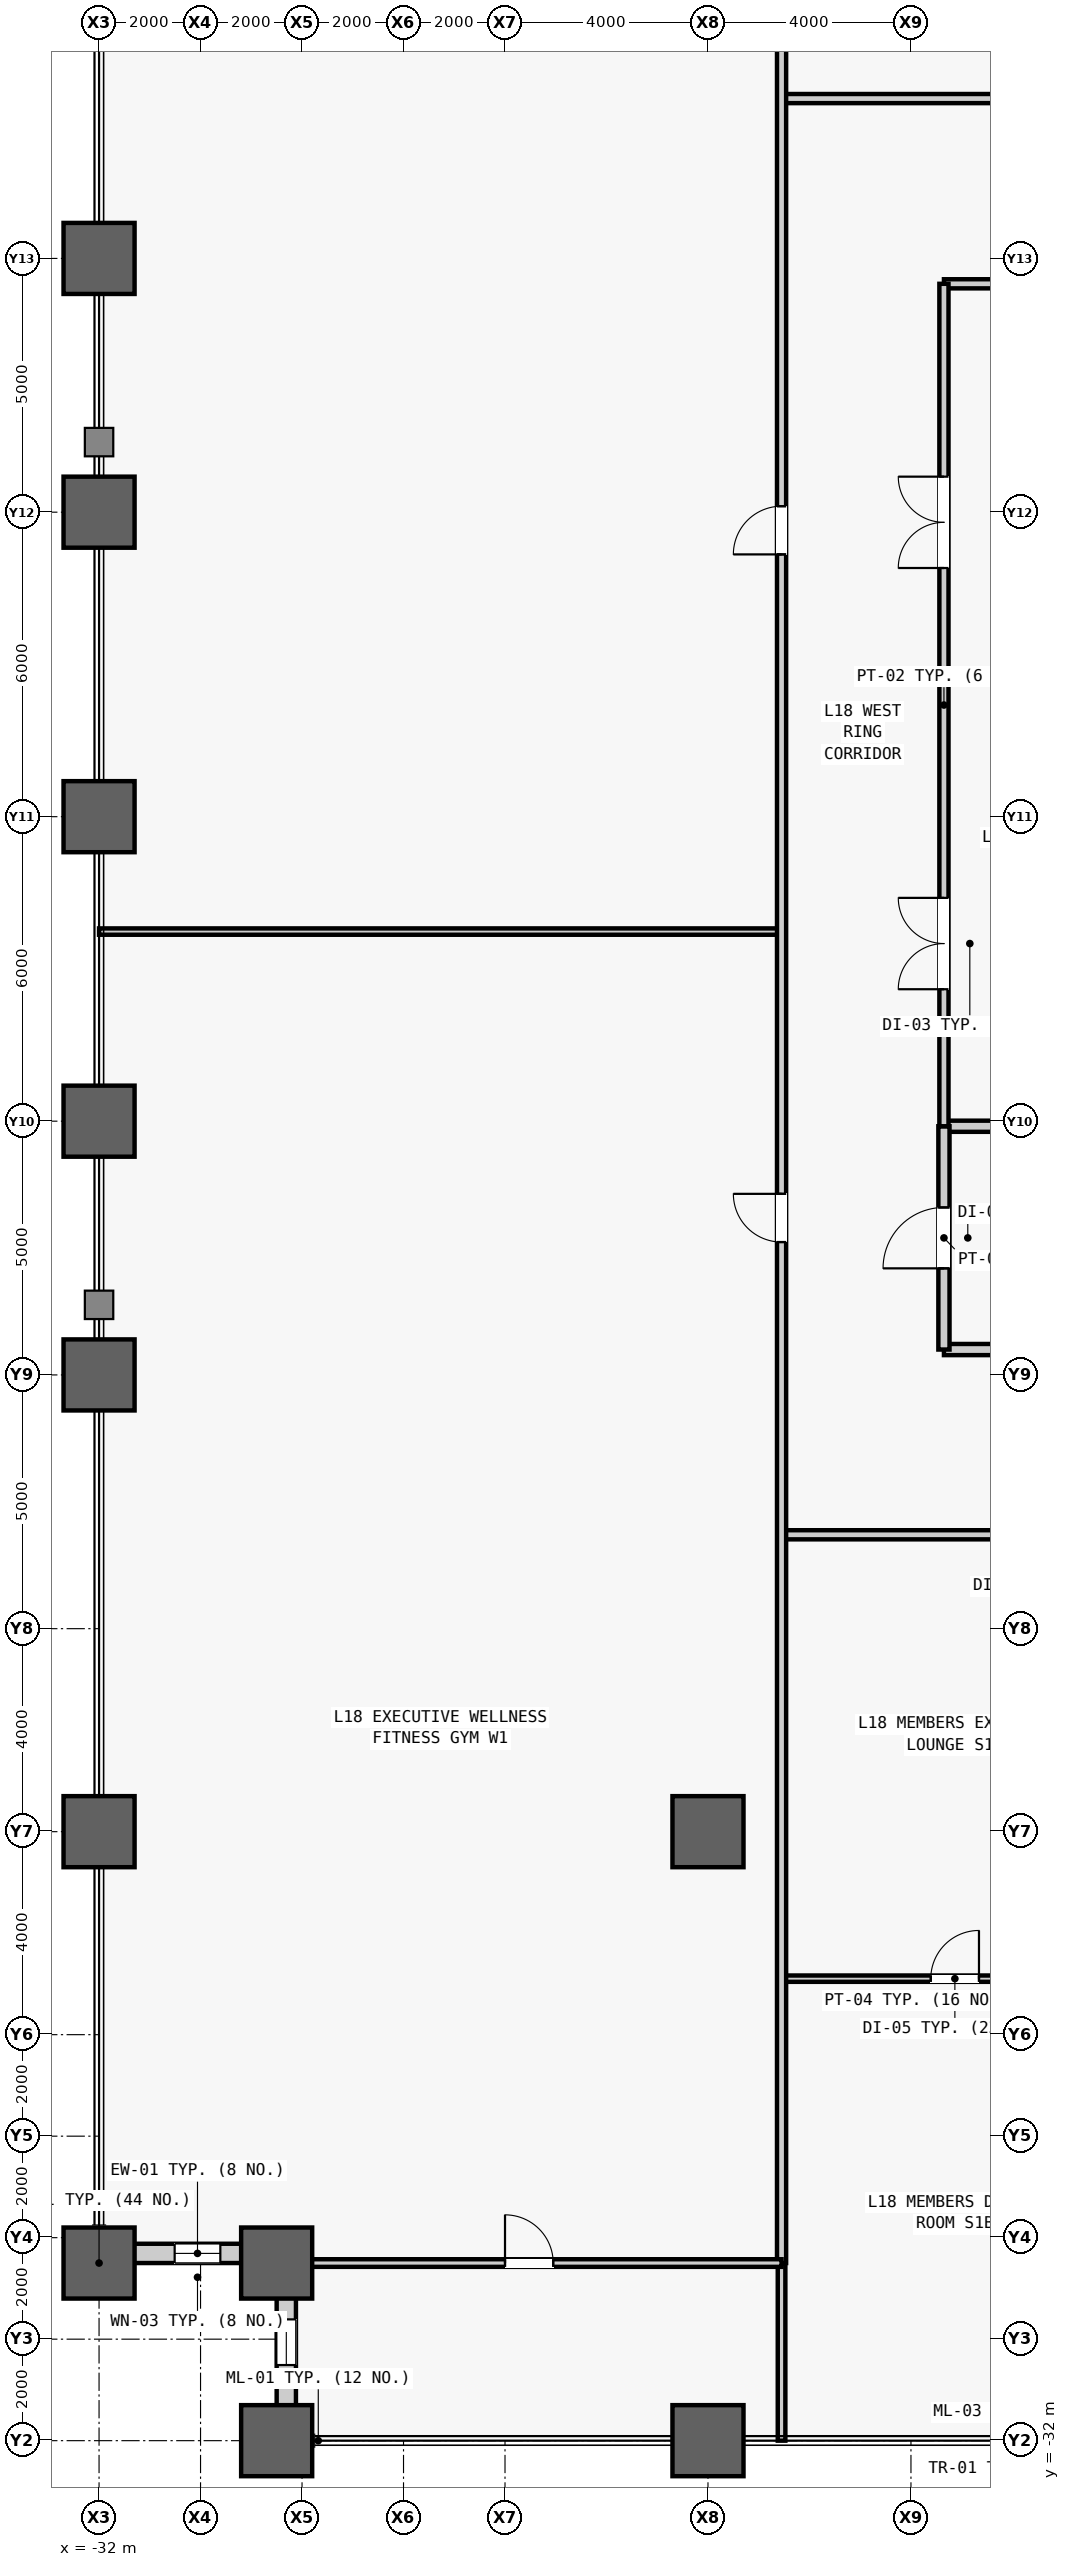
"""IFC4 building model, lengths in metres.
Left out: names, types, materials, properties, quantities, classifications, styles, units other than length and angle.
Written with IfcOpenShell. Run it as: python <this file> out.ifc"""

import sys

from ifc_helpers import new_model, si_unit, direction, frame, frame_2d, origin, origin_2d, place, context, subcontext, project, spatial, rectangle, hollow_rectangle, extrude, source, transform, mapped, element, fill, save


model = new_model("IFC4")
c1 = context("Model", 3, precision=1e-05, world=origin(), true_north=direction((0.0, 1.0)))
c2 = subcontext(c1, "Body", "Model", "MODEL_VIEW")
j1 = project(units=[si_unit("LENGTHUNIT", "METRE"), si_unit("PLANEANGLEUNIT", "RADIAN")], contexts=[c1])
p1 = place(None, origin())
s1 = spatial("IfcSite", under=j1, at=p1, CompositionType="ELEMENT")
p2 = place(p1, origin())
s2 = spatial("IfcBuilding", under=s1, at=p2, CompositionType="ELEMENT")
p3 = place(p2, frame((0.0, 0.0, 83.0)))
s3 = spatial("IfcBuildingStorey", under=s2, at=p3, CompositionType="ELEMENT", Elevation=83.0)
m1 = source(origin(), c2, "Body", "SweptSolid", [
    extrude(hollow_rectangle(XDim=1.4, YDim=1.4, WallThickness=0.075, at=origin_2d()), origin(), (0.0, 0.0, 1.0), 4.2),
])
for number, where, z_axis, x_axis in (
    (1, (-32.0, -28.5, 0.0), (0.0, 0.0, 1.0), (1.0, 0.0, 0.0)),
    (2, (-32.0, -20.0, 0.0), (0.0, 0.0, 1.0), (1.0, 0.0, 0.0)),
    (3, (-32.0, -11.0, 0.0), (0.0, 0.0, 1.0), (1.0, 0.0, 0.0)),
    (4, (-32.0, -6.0, 0.0), (0.0, 0.0, 1.0), (1.0, 0.0, 0.0)),
    (5, (-32.0, 0.0, 0.0), (0.0, 0.0, 1.0), (1.0, 0.0, 0.0)),
    (6, (-32.0, 6.0, 0.0), (0.0, 0.0, 1.0), (1.0, 0.0, 0.0)),
    (7, (-32.0, 11.0, 0.0), (0.0, 0.0, 1.0), (1.0, 0.0, 0.0)),
    (8, (-28.5, -32.0, 0.0), (0.0, 0.0, 1.0), (1.0, 0.0, 0.0)),
    (9, (-28.5, -28.5, 0.0), (0.0, 0.0, 1.0), (1.0, 0.0, 0.0)),
    (10, (-20.0, -32.0, 0.0), (0.0, 0.0, 1.0), (1.0, 0.0, 0.0)),
    (11, (-20.0, -20.0, 0.0), (0.0, 0.0, 1.0), (1.0, 0.0, 0.0)),
):
    element("IfcColumn", number, at=place(p3, frame(where, z_axis=z_axis, x_axis=x_axis)), inside=s3, PredefinedType="COLUMN", context=c2, shape_type="MappedRepresentation", body=[
        mapped(m1, transform((0.0, 0.0, 0.0), scale=1.0)),
    ])
m2 = source(origin(), c2, "Body", "SweptSolid", [
    extrude(rectangle(XDim=3.12, YDim=0.38, at=frame_2d((1.56, 0.0))), origin(), (0.0, 0.0, 1.0), 3.245),
])
p4 = place(p3, frame((-28.5, -28.31, 0.0), z_axis=(0.0, 0.0, 1.0), x_axis=(-1.0, 0.0, 0.0)))
e12 = element("IfcWall", 12, at=p4, inside=s3, PredefinedType="STANDARD", context=c2, shape_type="MappedRepresentation", body=[
    mapped(m2, transform((0.0, 0.0, 0.0), scale=1.0)),
])
m3 = source(origin(), c2, "Body", "SweptSolid", [
    extrude(rectangle(XDim=0.9, YDim=2.4, at=frame_2d((0.45, 1.2))), frame((0.0, 0.2, 0.0), z_axis=(0.0, -1.0, 0.0), x_axis=(1.0, 0.0, 0.0)), (0.0, 0.0, 1.0), 0.4),
])
p5 = place(p4, frame((1.11, 0.0, 0.5)))
e13 = element("IfcOpeningElement", 13, at=p5, cuts=e12, PredefinedType="OPENING", context=c2, shape_type="MappedRepresentation", body=[
    mapped(m3, transform((0.0, 0.0, 0.0), scale=1.0)),
])
p6 = place(p3, frame((-28.31, -31.62, 0.0), z_axis=(0.0, 0.0, 1.0), x_axis=(0.0, 1.0, 0.0)))
e14 = element("IfcWall", 14, at=p6, inside=s3, PredefinedType="STANDARD", context=c2, shape_type="MappedRepresentation", body=[
    mapped(m2, transform((0.0, 0.0, 0.0), scale=1.0)),
])
p7 = place(p6, frame((1.11, 0.0, 0.5)))
e15 = element("IfcOpeningElement", 15, at=p7, cuts=e14, PredefinedType="OPENING", context=c2, shape_type="MappedRepresentation", body=[
    mapped(m3, transform((0.0, 0.0, 0.0), scale=1.0)),
])
m4 = source(origin(), c2, "Body", "SweptSolid", [
    extrude(rectangle(XDim=4.05, YDim=0.22, at=frame_2d((2.025, 0.0))), origin(), (0.0, 0.0, 1.0), 3.94),
])
p8 = place(p3, frame((-15.35, -10.5, 0.0), z_axis=(0.0, 0.0, 1.0), x_axis=(1.0, 0.0, 0.0)))
e16 = element("IfcWall", 16, at=p8, inside=s3, PredefinedType="PARTITIONING", context=c2, shape_type="MappedRepresentation", body=[
    mapped(m4, transform((0.0, 0.0, 0.0), scale=1.0)),
])
m5 = source(origin(), c2, "Body", "SweptSolid", [
    extrude(rectangle(XDim=4.05, YDim=0.22, at=frame_2d((2.025, 0.0))), origin(), (0.0, 0.0, 1.0), 3.085),
])
p9 = place(p3, frame((-15.35, -6.1, 0.0), z_axis=(0.0, 0.0, 1.0), x_axis=(1.0, 0.0, 0.0)))
e17 = element("IfcWall", 17, at=p9, inside=s3, PredefinedType="PARTITIONING", context=c2, shape_type="MappedRepresentation", body=[
    mapped(m5, transform((0.0, 0.0, 0.0), scale=1.0)),
])
m6 = source(origin(), c2, "Body", "SweptSolid", [
    extrude(rectangle(XDim=4.4, YDim=0.22, at=frame_2d((2.2, 0.0))), origin(), (0.0, 0.0, 1.0), 3.94),
])
p10 = place(p3, frame((-15.35, -10.5, 0.0), z_axis=(0.0, 0.0, 1.0), x_axis=(0.0, 1.0, 0.0)))
e18 = element("IfcWall", 18, at=p10, inside=s3, PredefinedType="PARTITIONING", context=c2, shape_type="MappedRepresentation", body=[
    mapped(m6, transform((0.0, 0.0, 0.0), scale=1.0)),
])
m7 = source(origin(), c2, "Body", "SweptSolid", [
    extrude(rectangle(XDim=1.2, YDim=2.2, at=frame_2d((0.6, 1.1))), frame((0.0, 0.12, 0.0), z_axis=(0.0, -1.0, 0.0), x_axis=(1.0, 0.0, 0.0)), (0.0, 0.0, 1.0), 0.24),
])
p11 = place(p10, frame((1.6, 0.0, 0.0)))
e19 = element("IfcOpeningElement", 19, at=p11, cuts=e18, PredefinedType="OPENING", context=c2, shape_type="MappedRepresentation", body=[
    mapped(m7, transform((0.0, 0.0, 0.0), scale=1.0)),
])
m8 = source(origin(), c2, "Body", "SweptSolid", [
    extrude(rectangle(XDim=4.05, YDim=0.18, at=frame_2d((2.025, 0.0))), origin(), (0.0, 0.0, 1.0), 3.94),
])
p12 = place(p3, frame((-15.35, 10.5, 0.0), z_axis=(0.0, 0.0, 1.0), x_axis=(1.0, 0.0, 0.0)))
e20 = element("IfcWall", 20, at=p12, inside=s3, PredefinedType="PARTITIONING", context=c2, shape_type="MappedRepresentation", body=[
    mapped(m8, transform((0.0, 0.0, 0.0), scale=1.0)),
])
m9 = source(origin(), c2, "Body", "SweptSolid", [
    extrude(rectangle(XDim=16.6, YDim=0.18, at=frame_2d((8.3, 0.0))), origin(), (0.0, 0.0, 1.0), 3.94),
])
p13 = place(p3, frame((-15.35, -6.1, 0.0), z_axis=(0.0, 0.0, 1.0), x_axis=(0.0, 1.0, 0.0)))
e21 = element("IfcWall", 21, at=p13, inside=s3, PredefinedType="PARTITIONING", context=c2, shape_type="MappedRepresentation", body=[
    mapped(m9, transform((0.0, 0.0, 0.0), scale=1.0)),
])
m10 = source(origin(), c2, "Body", "SweptSolid", [
    extrude(rectangle(XDim=1.8, YDim=2.25, at=frame_2d((0.9, 1.125))), frame((0.0, 0.1, 0.0), z_axis=(0.0, -1.0, 0.0), x_axis=(1.0, 0.0, 0.0)), (0.0, 0.0, 1.0), 0.2),
])
p14 = place(p13, frame((2.7, 0.0, 0.0)))
e22 = element("IfcOpeningElement", 22, at=p14, cuts=e21, PredefinedType="OPENING", context=c2, shape_type="MappedRepresentation", body=[
    mapped(m10, transform((0.0, 0.0, 0.0), scale=1.0)),
])
p15 = place(p13, frame((11.0, 0.0, 0.0)))
e23 = element("IfcOpeningElement", 23, at=p15, cuts=e21, PredefinedType="OPENING", context=c2, shape_type="MappedRepresentation", body=[
    mapped(m10, transform((0.0, 0.0, 0.0), scale=1.0)),
])
m11 = source(origin(), c2, "Body", "SweptSolid", [
    extrude(rectangle(XDim=6.831, YDim=0.125, at=frame_2d((3.416, 0.0))), origin(), (0.0, 0.0, 1.0), 3.94),
])
p16 = place(p3, frame((-18.55, -22.896, 0.0), z_axis=(0.0, 0.0, 1.0), x_axis=(1.0, 0.0, 0.0)))
e24 = element("IfcWall", 24, at=p16, inside=s3, PredefinedType="PARTITIONING", context=c2, shape_type="MappedRepresentation", body=[
    mapped(m11, transform((0.0, 0.0, 0.0), scale=1.0)),
])
m12 = source(origin(), c2, "Body", "SweptSolid", [
    extrude(rectangle(XDim=0.95, YDim=2.15, at=frame_2d((0.475, 1.075))), frame((0.0, 0.073, 0.0), z_axis=(0.0, -1.0, 0.0), x_axis=(1.0, 0.0, 0.0)), (0.0, 0.0, 1.0), 0.145),
])
p17 = place(p16, frame((2.94, 0.0, 0.0)))
e25 = element("IfcOpeningElement", 25, at=p17, cuts=e24, PredefinedType="OPENING", context=c2, shape_type="MappedRepresentation", body=[
    mapped(m12, transform((0.0, 0.0, 0.0), scale=1.0)),
])
m13 = source(origin(), c2, "Body", "SweptSolid", [
    extrude(rectangle(XDim=37.95, YDim=0.18, at=frame_2d((18.975, 0.0))), origin(), (0.0, 0.0, 1.0), 3.94),
])
p18 = place(p3, frame((-18.55, -14.15, 0.0), z_axis=(0.0, 0.0, 1.0), x_axis=(1.0, 0.0, 0.0)))
e26 = element("IfcWall", 26, at=p18, inside=s3, PredefinedType="PARTITIONING", context=c2, shape_type="MappedRepresentation", body=[
    mapped(m13, transform((0.0, 0.0, 0.0), scale=1.0)),
])
m14 = source(origin(), c2, "Body", "SweptSolid", [
    extrude(rectangle(XDim=1.05, YDim=2.2, at=frame_2d((0.525, 1.1))), frame((0.0, 0.1, 0.0), z_axis=(0.0, -1.0, 0.0), x_axis=(1.0, 0.0, 0.0)), (0.0, 0.0, 1.0), 0.2),
])
p19 = place(p18, frame((4.966, 0.0, 0.0)))
e27 = element("IfcOpeningElement", 27, at=p19, cuts=e26, PredefinedType="OPENING", context=c2, shape_type="MappedRepresentation", body=[
    mapped(m14, transform((0.0, 0.0, 0.0), scale=1.0)),
])
p20 = place(p18, frame((10.291, 0.0, 0.0)))
e28 = element("IfcOpeningElement", 28, at=p20, cuts=e26, PredefinedType="OPENING", context=c2, shape_type="MappedRepresentation", body=[
    mapped(m14, transform((0.0, 0.0, 0.0), scale=1.0)),
])
p21 = place(p18, frame((18.64, 0.0, 0.0)))
e29 = element("IfcOpeningElement", 29, at=p21, cuts=e26, PredefinedType="OPENING", context=c2, shape_type="MappedRepresentation", body=[
    mapped(m14, transform((0.0, 0.0, 0.0), scale=1.0)),
])
p22 = place(p18, frame((27.178, 0.0, 0.0)))
e30 = element("IfcOpeningElement", 30, at=p22, cuts=e26, PredefinedType="OPENING", context=c2, shape_type="MappedRepresentation", body=[
    mapped(m14, transform((0.0, 0.0, 0.0), scale=1.0)),
])
p23 = place(p3, frame((-18.55, 14.15, 0.0), z_axis=(0.0, 0.0, 1.0), x_axis=(1.0, 0.0, 0.0)))
e31 = element("IfcWall", 31, at=p23, inside=s3, PredefinedType="PARTITIONING", context=c2, shape_type="MappedRepresentation", body=[
    mapped(m13, transform((0.0, 0.0, 0.0), scale=1.0)),
])
p24 = place(p23, frame((7.242, 0.0, 0.0)))
e32 = element("IfcOpeningElement", 32, at=p24, cuts=e31, PredefinedType="OPENING", context=c2, shape_type="MappedRepresentation", body=[
    mapped(m14, transform((0.0, 0.0, 0.0), scale=1.0)),
])
p25 = place(p23, frame((17.691, 0.0, 0.0)))
e33 = element("IfcOpeningElement", 33, at=p25, cuts=e31, PredefinedType="OPENING", context=c2, shape_type="MappedRepresentation", body=[
    mapped(m14, transform((0.0, 0.0, 0.0), scale=1.0)),
])
p26 = place(p23, frame((28.473, 0.0, 0.0)))
e34 = element("IfcOpeningElement", 34, at=p26, cuts=e31, PredefinedType="OPENING", context=c2, shape_type="MappedRepresentation", body=[
    mapped(m14, transform((0.0, 0.0, 0.0), scale=1.0)),
])
m15 = source(origin(), c2, "Body", "SweptSolid", [
    extrude(rectangle(XDim=3.5, YDim=0.15, at=frame_2d((1.75, 0.0))), origin(), (0.0, 0.0, 1.0), 3.94),
])
p27 = place(p3, frame((-18.55, -32.0, 0.0), z_axis=(0.0, 0.0, 1.0), x_axis=(0.0, 1.0, 0.0)))
e35 = element("IfcWall", 35, at=p27, inside=s3, PredefinedType="PARTITIONING", context=c2, shape_type="MappedRepresentation", body=[
    mapped(m15, transform((0.0, 0.0, 0.0), scale=1.0)),
])
m16 = source(origin(), c2, "Body", "SweptSolid", [
    extrude(rectangle(XDim=13.45, YDim=0.125, at=frame_2d((6.725, 0.0))), origin(), (0.0, 0.0, 1.0), 3.94),
])
p28 = place(p3, frame((-32.0, -2.264, 0.0), z_axis=(0.0, 0.0, 1.0), x_axis=(1.0, 0.0, 0.0)))
e36 = element("IfcWall", 36, at=p28, inside=s3, PredefinedType="PARTITIONING", context=c2, shape_type="MappedRepresentation", body=[
    mapped(m16, transform((0.0, 0.0, 0.0), scale=1.0)),
])
m17 = source(origin(), c2, "Body", "SweptSolid", [
    extrude(rectangle(XDim=57.0, YDim=0.18, at=frame_2d((28.5, 0.0))), origin(), (0.0, 0.0, 1.0), 3.94),
])
p29 = place(p3, frame((-18.55, -28.5, 0.0), z_axis=(0.0, 0.0, 1.0), x_axis=(0.0, 1.0, 0.0)))
e37 = element("IfcWall", 37, at=p29, inside=s3, PredefinedType="PARTITIONING", context=c2, shape_type="MappedRepresentation", body=[
    mapped(m17, transform((0.0, 0.0, 0.0), scale=1.0)),
])
m18 = source(origin(), c2, "Body", "SweptSolid", [
    extrude(rectangle(XDim=0.95, YDim=2.15, at=frame_2d((0.475, 1.075))), frame((0.0, 0.1, 0.0), z_axis=(0.0, -1.0, 0.0), x_axis=(1.0, 0.0, 0.0)), (0.0, 0.0, 1.0), 0.2),
])
p30 = place(p29, frame((20.118, 0.0, 0.0)))
e38 = element("IfcOpeningElement", 38, at=p30, cuts=e37, PredefinedType="OPENING", context=c2, shape_type="MappedRepresentation", body=[
    mapped(m18, transform((0.0, 0.0, 0.0), scale=1.0)),
])
p31 = place(p29, frame((33.668, 0.0, 0.0)))
e39 = element("IfcOpeningElement", 39, at=p31, cuts=e37, PredefinedType="OPENING", context=c2, shape_type="MappedRepresentation", body=[
    mapped(m18, transform((0.0, 0.0, 0.0), scale=1.0)),
])
m19 = source(origin(), c2, "Body", "SweptSolid", [
    extrude(rectangle(XDim=9.95, YDim=0.15, at=frame_2d((4.975, 0.0))), origin(), (0.0, 0.0, 1.0), 3.94),
])
p32 = place(p3, frame((-28.5, -28.5, 0.0), z_axis=(0.0, 0.0, 1.0), x_axis=(1.0, 0.0, 0.0)))
e40 = element("IfcWall", 40, at=p32, inside=s3, PredefinedType="PARTITIONING", context=c2, shape_type="MappedRepresentation", body=[
    mapped(m19, transform((0.0, 0.0, 0.0), scale=1.0)),
])
m20 = source(origin(), c2, "Body", "SweptSolid", [
    extrude(rectangle(XDim=0.95, YDim=2.15, at=frame_2d((0.475, 1.075))), frame((0.0, 0.085, 0.0), z_axis=(0.0, -1.0, 0.0), x_axis=(1.0, 0.0, 0.0)), (0.0, 0.0, 1.0), 0.17),
])
p33 = place(p32, frame((4.5, 0.0, 0.0)))
e41 = element("IfcOpeningElement", 41, at=p33, cuts=e40, PredefinedType="OPENING", context=c2, shape_type="MappedRepresentation", body=[
    mapped(m20, transform((0.0, 0.0, 0.0), scale=1.0)),
])
m21 = source(origin(), c2, "Body", "SweptSolid", [
    extrude(rectangle(XDim=0.9, YDim=2.4, at=frame_2d((0.45, 1.2))), frame((0.0, 0.03, 0.0), z_axis=(0.0, -1.0, 0.0), x_axis=(1.0, 0.0, 0.0)), (0.0, 0.0, 1.0), 0.06),
])
p34 = place(p5, origin())
e42 = element("IfcWindow", 42, at=p34, inside=s3, PartitioningType="SINGLE_PANEL", PredefinedType="WINDOW", context=c2, shape_type="MappedRepresentation", body=[
    mapped(m21, transform((0.0, 0.0, 0.0), scale=1.0)),
])
fill(e13, e42)
p35 = place(p7, origin())
e43 = element("IfcWindow", 43, at=p35, inside=s3, PartitioningType="SINGLE_PANEL", PredefinedType="WINDOW", context=c2, shape_type="MappedRepresentation", body=[
    mapped(m21, transform((0.0, 0.0, 0.0), scale=1.0)),
])
fill(e15, e43)
m22 = source(origin(), c2, "Body", "SweptSolid", [
    extrude(rectangle(XDim=1.2, YDim=2.2, at=frame_2d((0.6, 1.1))), frame((0.0, 0.025, 0.0), z_axis=(0.0, -1.0, 0.0), x_axis=(1.0, 0.0, 0.0)), (0.0, 0.0, 1.0), 0.05),
])
p36 = place(p11, origin())
e44 = element("IfcDoor", 44, at=p36, inside=s3, OperationType="SINGLE_SWING_LEFT", PredefinedType="DOOR", context=c2, shape_type="MappedRepresentation", body=[
    mapped(m22, transform((0.0, 0.0, 0.0), scale=1.0)),
])
fill(e19, e44)
m23 = source(origin(), c2, "Body", "SweptSolid", [
    extrude(rectangle(XDim=1.8, YDim=2.25, at=frame_2d((0.9, 1.125))), frame((0.0, 0.025, 0.0), z_axis=(0.0, -1.0, 0.0), x_axis=(1.0, 0.0, 0.0)), (0.0, 0.0, 1.0), 0.05),
])
p37 = place(p14, origin())
e45 = element("IfcDoor", 45, at=p37, inside=s3, OperationType="SINGLE_SWING_LEFT", PredefinedType="DOOR", context=c2, shape_type="MappedRepresentation", body=[
    mapped(m23, transform((0.0, 0.0, 0.0), scale=1.0)),
])
fill(e22, e45)
p38 = place(p15, origin())
e46 = element("IfcDoor", 46, at=p38, inside=s3, OperationType="SINGLE_SWING_RIGHT", PredefinedType="DOOR", context=c2, shape_type="MappedRepresentation", body=[
    mapped(m23, transform((0.0, 0.0, 0.0), scale=1.0)),
])
fill(e23, e46)
m24 = source(origin(), c2, "Body", "SweptSolid", [
    extrude(rectangle(XDim=0.95, YDim=2.15, at=frame_2d((0.475, 1.075))), frame((0.0, 0.025, 0.0), z_axis=(0.0, -1.0, 0.0), x_axis=(1.0, 0.0, 0.0)), (0.0, 0.0, 1.0), 0.05),
])
p39 = place(p17, origin())
e47 = element("IfcDoor", 47, at=p39, inside=s3, OperationType="SINGLE_SWING_RIGHT", PredefinedType="DOOR", context=c2, shape_type="MappedRepresentation", body=[
    mapped(m24, transform((0.0, 0.0, 0.0), scale=1.0)),
])
fill(e25, e47)
p40 = place(p30, origin())
e48 = element("IfcDoor", 48, at=p40, inside=s3, OperationType="SINGLE_SWING_RIGHT", PredefinedType="DOOR", context=c2, shape_type="MappedRepresentation", body=[
    mapped(m24, transform((0.0, 0.0, 0.0), scale=1.0)),
])
fill(e38, e48)
p41 = place(p31, origin())
e49 = element("IfcDoor", 49, at=p41, inside=s3, OperationType="SINGLE_SWING_LEFT", PredefinedType="DOOR", context=c2, shape_type="MappedRepresentation", body=[
    mapped(m24, transform((0.0, 0.0, 0.0), scale=1.0)),
])
fill(e39, e49)
p42 = place(p33, origin())
e50 = element("IfcDoor", 50, at=p42, inside=s3, OperationType="SINGLE_SWING_LEFT", PredefinedType="DOOR", context=c2, shape_type="MappedRepresentation", body=[
    mapped(m24, transform((0.0, 0.0, 0.0), scale=1.0)),
])
fill(e41, e50)
save(model, sys.argv[1])
